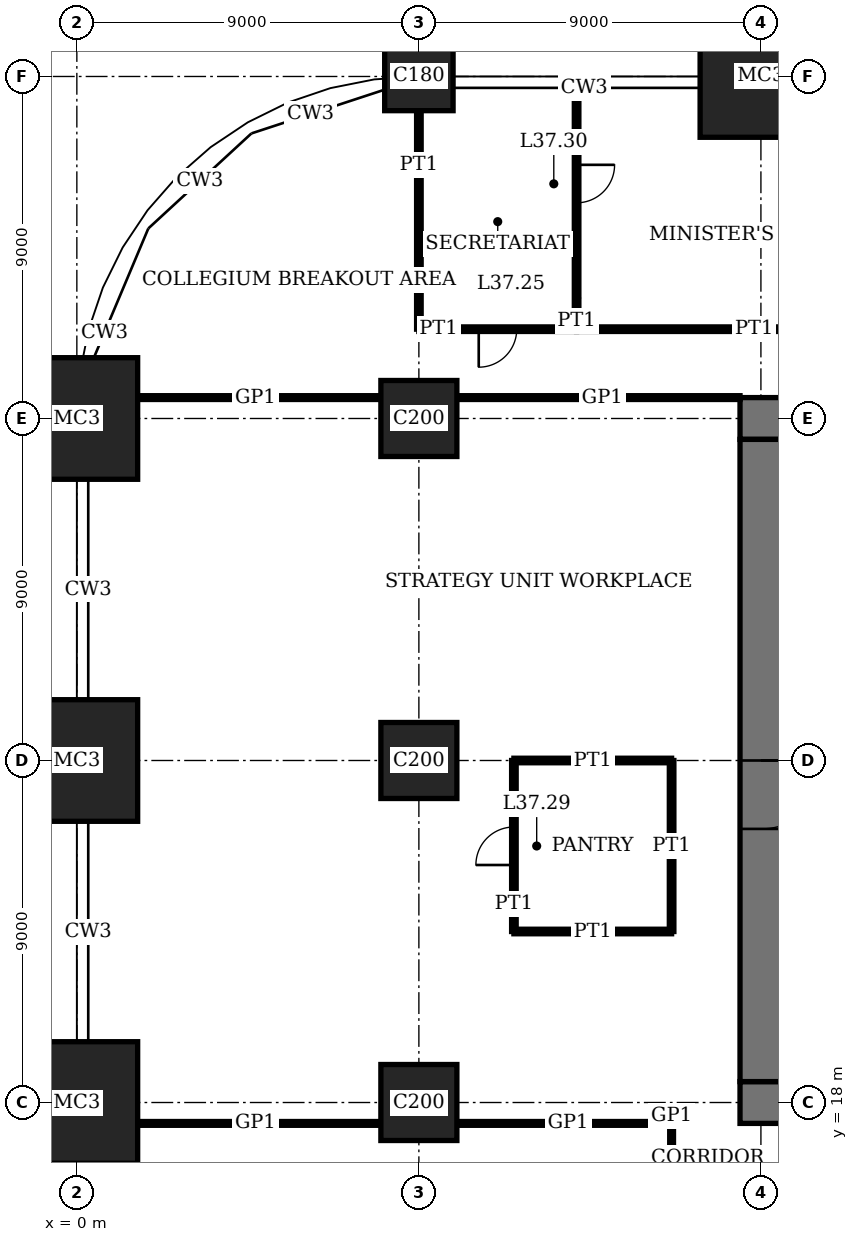
"""IFC4 building model, lengths in metres.
Left out: names, types, materials, properties, quantities, classifications, styles, units other than length and angle.
Written with IfcOpenShell. Run it as: python <this file> out.ifc"""

import sys

from ifc_helpers import new_model, si_unit, direction, frame, frame_2d, origin, origin_2d, place, context, subcontext, project, spatial, rectangle, extrude, element, fill, save


model = new_model("IFC4")
c1 = context("Model", 3, precision=1e-05, world=origin(), true_north=direction((0.0, 1.0)))
c2 = subcontext(c1, "Body", "Model", "MODEL_VIEW")
j1 = project(units=[si_unit("LENGTHUNIT", "METRE"), si_unit("PLANEANGLEUNIT", "RADIAN")], contexts=[c1])
p1 = place(None, origin())
s1 = spatial("IfcSite", under=j1, at=p1, CompositionType="ELEMENT")
p2 = place(p1, origin())
s2 = spatial("IfcBuilding", under=s1, at=p2, CompositionType="ELEMENT")
p3 = place(p2, frame((0.0, 0.0, 153.0)))
s3 = spatial("IfcBuildingStorey", under=s2, at=p3, CompositionType="ELEMENT", Elevation=153.0)
for number, where, z_axis, x_axis in (
    (1, (0.0, 18.0, 0.0), (0.0, 0.0, 1.0), (1.0, 0.0, 0.0)),
    (2, (0.0, 27.0, 0.0), (0.0, 0.0, 1.0), (1.0, 0.0, 0.0)),
    (3, (0.0, 36.0, 0.0), (0.0, 0.0, 1.0), (1.0, 0.0, 0.0)),
):
    element("IfcColumn", number, at=place(p3, frame(where, z_axis=z_axis, x_axis=x_axis)), inside=s3, PredefinedType="COLUMN", context=c2, shape_type="SweptSolid", body=[
        extrude(rectangle(XDim=3.2, YDim=3.2, at=origin_2d()), origin(), (0.0, 0.0, 1.0), 4.2),
    ])
for number, where, z_axis, x_axis in (
    (4, (9.0, 18.0, 0.0), (0.0, 0.0, 1.0), (1.0, 0.0, 0.0)),
    (5, (9.0, 27.0, 0.0), (0.0, 0.0, 1.0), (1.0, 0.0, 0.0)),
    (6, (9.0, 36.0, 0.0), (0.0, 0.0, 1.0), (1.0, 0.0, 0.0)),
):
    element("IfcColumn", number, at=place(p3, frame(where, z_axis=z_axis, x_axis=x_axis)), inside=s3, PredefinedType="COLUMN", context=c2, shape_type="SweptSolid", body=[
        extrude(rectangle(XDim=2.0, YDim=2.0, at=origin_2d()), origin(), (0.0, 0.0, 1.0), 4.2),
    ])
p4 = place(p3, frame((9.0, 45.0, 0.0), z_axis=(0.0, 0.0, 1.0), x_axis=(1.0, 0.0, 0.0)))
e7 = element("IfcColumn", 7, at=p4, inside=s3, PredefinedType="COLUMN", context=c2, shape_type="SweptSolid", body=[
    extrude(rectangle(XDim=1.8, YDim=1.8, at=origin_2d()), origin(), (0.0, 0.0, 1.0), 4.2),
])
p5 = place(p3, frame((18.0, 45.0, 0.0), z_axis=(0.0, 0.0, 1.0), x_axis=(1.0, 0.0, 0.0)))
e8 = element("IfcColumn", 8, at=p5, inside=s3, PredefinedType="COLUMN", context=c2, shape_type="SweptSolid", body=[
    extrude(rectangle(XDim=3.2, YDim=3.2, at=origin_2d()), origin(), (0.0, 0.0, 1.0), 4.2),
])
p6 = place(p3, frame((17.45, 18.0, 0.0), z_axis=(0.0, 0.0, 1.0), x_axis=(1.0, 0.0, 0.0)))
e9 = element("IfcWall", 9, at=p6, inside=s3, PredefinedType="SHEAR", context=c2, shape_type="SweptSolid", body=[
    extrude(rectangle(XDim=28.1, YDim=1.1, at=frame_2d((14.05, 0.0))), origin(), (0.0, 0.0, 1.0), 4.2),
])
p7 = place(p6, frame((11.55, 0.0, 0.0)))
e10 = element("IfcOpeningElement", 10, at=p7, cuts=e9, PredefinedType="OPENING", context=c2, shape_type="SweptSolid", body=[
    extrude(rectangle(XDim=1.0, YDim=2.4, at=frame_2d((0.5, 1.2))), frame((0.0, 0.56, 0.0), z_axis=(0.0, -1.0, 0.0), x_axis=(1.0, 0.0, 0.0)), (0.0, 0.0, 1.0), 1.12),
])
p8 = place(p6, frame((16.55, 0.0, 0.0)))
e11 = element("IfcOpeningElement", 11, at=p8, cuts=e9, PredefinedType="OPENING", context=c2, shape_type="SweptSolid", body=[
    extrude(rectangle(XDim=1.0, YDim=2.4, at=frame_2d((0.5, 1.2))), frame((0.0, 0.56, 0.0), z_axis=(0.0, -1.0, 0.0), x_axis=(1.0, 0.0, 0.0)), (0.0, 0.0, 1.0), 1.12),
])
p9 = place(p6, frame((20.0, 0.0, 0.0)))
e12 = element("IfcOpeningElement", 12, at=p9, cuts=e9, PredefinedType="OPENING", context=c2, shape_type="SweptSolid", body=[
    extrude(rectangle(XDim=1.1, YDim=2.4, at=frame_2d((0.55, 1.2))), frame((0.0, 0.56, 0.0), z_axis=(0.0, -1.0, 0.0), x_axis=(1.0, 0.0, 0.0)), (0.0, 0.0, 1.0), 1.12),
])
p10 = place(p6, frame((24.05, 0.0, 0.0)))
e13 = element("IfcOpeningElement", 13, at=p10, cuts=e9, PredefinedType="OPENING", context=c2, shape_type="SweptSolid", body=[
    extrude(rectangle(XDim=1.0, YDim=2.4, at=frame_2d((0.5, 1.2))), frame((0.0, 0.56, 0.0), z_axis=(0.0, -1.0, 0.0), x_axis=(1.0, 0.0, 0.0)), (0.0, 0.0, 1.0), 1.12),
])
p11 = place(p3, frame((45.55, 36.0, 0.0), z_axis=(0.0, 0.0, 1.0), x_axis=(-1.0, 0.0, 0.0)))
e14 = element("IfcWall", 14, at=p11, inside=s3, PredefinedType="SHEAR", context=c2, shape_type="SweptSolid", body=[
    extrude(rectangle(XDim=28.1, YDim=1.1, at=frame_2d((14.05, 0.0))), origin(), (0.0, 0.0, 1.0), 4.2),
])
p12 = place(p11, frame((11.55, 0.0, 0.0)))
e15 = element("IfcOpeningElement", 15, at=p12, cuts=e14, PredefinedType="OPENING", context=c2, shape_type="SweptSolid", body=[
    extrude(rectangle(XDim=1.0, YDim=2.4, at=frame_2d((0.5, 1.2))), frame((0.0, 0.56, 0.0), z_axis=(0.0, -1.0, 0.0), x_axis=(1.0, 0.0, 0.0)), (0.0, 0.0, 1.0), 1.12),
])
p13 = place(p11, frame((16.55, 0.0, 0.0)))
e16 = element("IfcOpeningElement", 16, at=p13, cuts=e14, PredefinedType="OPENING", context=c2, shape_type="SweptSolid", body=[
    extrude(rectangle(XDim=1.0, YDim=2.4, at=frame_2d((0.5, 1.2))), frame((0.0, 0.56, 0.0), z_axis=(0.0, -1.0, 0.0), x_axis=(1.0, 0.0, 0.0)), (0.0, 0.0, 1.0), 1.12),
])
p14 = place(p11, frame((20.0, 0.0, 0.0)))
e17 = element("IfcOpeningElement", 17, at=p14, cuts=e14, PredefinedType="OPENING", context=c2, shape_type="SweptSolid", body=[
    extrude(rectangle(XDim=1.1, YDim=2.4, at=frame_2d((0.55, 1.2))), frame((0.0, 0.56, 0.0), z_axis=(0.0, -1.0, 0.0), x_axis=(1.0, 0.0, 0.0)), (0.0, 0.0, 1.0), 1.12),
])
p15 = place(p11, frame((24.05, 0.0, 0.0)))
e18 = element("IfcOpeningElement", 18, at=p15, cuts=e14, PredefinedType="OPENING", context=c2, shape_type="SweptSolid", body=[
    extrude(rectangle(XDim=1.0, YDim=2.4, at=frame_2d((0.5, 1.2))), frame((0.0, 0.56, 0.0), z_axis=(0.0, -1.0, 0.0), x_axis=(1.0, 0.0, 0.0)), (0.0, 0.0, 1.0), 1.12),
])
p16 = place(p3, frame((18.0, 35.45, 0.0), z_axis=(0.0, 0.0, 1.0), x_axis=(0.0, -1.0, 0.0)))
e19 = element("IfcWall", 19, at=p16, inside=s3, PredefinedType="SHEAR", context=c2, shape_type="SweptSolid", body=[
    extrude(rectangle(XDim=16.9, YDim=1.1, at=frame_2d((8.45, 0.0))), origin(), (0.0, 0.0, 1.0), 4.2),
])
p17 = place(p16, frame((8.45, 0.0, 0.0)))
e20 = element("IfcOpeningElement", 20, at=p17, cuts=e19, PredefinedType="OPENING", context=c2, shape_type="SweptSolid", body=[
    extrude(rectangle(XDim=1.8, YDim=2.4, at=frame_2d((0.9, 1.2))), frame((0.0, 0.56, 0.0), z_axis=(0.0, -1.0, 0.0), x_axis=(1.0, 0.0, 0.0)), (0.0, 0.0, 1.0), 1.12),
])
p18 = place(p3, frame((1.6, 17.45, 0.0), z_axis=(0.0, 0.0, 1.0), x_axis=(1.0, 0.0, 0.0)))
e21 = element("IfcWall", 21, at=p18, inside=s3, PredefinedType="PARTITIONING", context=c2, shape_type="SweptSolid", body=[
    extrude(rectangle(XDim=6.4, YDim=0.1, at=frame_2d((3.2, 0.0))), origin(), (0.0, 0.0, 1.0), 3.85),
])
p19 = place(p3, frame((10.0, 17.45, 0.0), z_axis=(0.0, 0.0, 1.0), x_axis=(1.0, 0.0, 0.0)))
e22 = element("IfcWall", 22, at=p19, inside=s3, PredefinedType="PARTITIONING", context=c2, shape_type="SweptSolid", body=[
    extrude(rectangle(XDim=5.65, YDim=0.1, at=frame_2d((2.825, 0.0))), origin(), (0.0, 0.0, 1.0), 3.85),
])
p20 = place(p3, frame((11.5, 22.5, 0.0), z_axis=(0.0, 0.0, 1.0), x_axis=(1.0, 0.0, 0.0)))
e23 = element("IfcWall", 23, at=p20, inside=s3, PredefinedType="PARTITIONING", context=c2, shape_type="SweptSolid", body=[
    extrude(rectangle(XDim=4.15, YDim=0.12, at=frame_2d((2.075, 0.0))), origin(), (0.0, 0.0, 1.0), 3.15),
])
p21 = place(p3, frame((11.5, 27.0, 0.0), z_axis=(0.0, 0.0, 1.0), x_axis=(1.0, 0.0, 0.0)))
e24 = element("IfcWall", 24, at=p21, inside=s3, PredefinedType="PARTITIONING", context=c2, shape_type="SweptSolid", body=[
    extrude(rectangle(XDim=4.15, YDim=0.12, at=frame_2d((2.075, 0.0))), origin(), (0.0, 0.0, 1.0), 3.25),
])
p22 = place(p3, frame((1.6, 36.55, 0.0), z_axis=(0.0, 0.0, 1.0), x_axis=(1.0, 0.0, 0.0)))
e25 = element("IfcWall", 25, at=p22, inside=s3, PredefinedType="PARTITIONING", context=c2, shape_type="SweptSolid", body=[
    extrude(rectangle(XDim=6.4, YDim=0.1, at=frame_2d((3.2, 0.0))), origin(), (0.0, 0.0, 1.0), 3.85),
])
p23 = place(p3, frame((10.0, 36.55, 0.0), z_axis=(0.0, 0.0, 1.0), x_axis=(1.0, 0.0, 0.0)))
e26 = element("IfcWall", 26, at=p23, inside=s3, PredefinedType="PARTITIONING", context=c2, shape_type="SweptSolid", body=[
    extrude(rectangle(XDim=7.45, YDim=0.1, at=frame_2d((3.725, 0.0))), origin(), (0.0, 0.0, 1.0), 3.85),
])
p24 = place(p3, frame((9.0, 38.35, 0.0), z_axis=(0.0, 0.0, 1.0), x_axis=(1.0, 0.0, 0.0)))
e27 = element("IfcWall", 27, at=p24, inside=s3, PredefinedType="PARTITIONING", context=c2, shape_type="SweptSolid", body=[
    extrude(rectangle(XDim=4.15, YDim=0.12, at=frame_2d((2.075, 0.0))), origin(), (0.0, 0.0, 1.0), 3.85),
])
p25 = place(p24, frame((1.575, 0.0, 0.0)))
e28 = element("IfcOpeningElement", 28, at=p25, cuts=e27, PredefinedType="OPENING", context=c2, shape_type="SweptSolid", body=[
    extrude(rectangle(XDim=1.0, YDim=2.4, at=frame_2d((0.5, 1.2))), frame((0.0, 0.07, 0.0), z_axis=(0.0, -1.0, 0.0), x_axis=(1.0, 0.0, 0.0)), (0.0, 0.0, 1.0), 0.14),
])
p26 = place(p3, frame((13.15, 38.35, 0.0), z_axis=(0.0, 0.0, 1.0), x_axis=(1.0, 0.0, 0.0)))
e29 = element("IfcWall", 29, at=p26, inside=s3, PredefinedType="PARTITIONING", context=c2, shape_type="SweptSolid", body=[
    extrude(rectangle(XDim=9.35, YDim=0.12, at=frame_2d((4.675, 0.0))), origin(), (0.0, 0.0, 1.0), 3.85),
])
p27 = place(p3, frame((9.0, 38.35, 0.0), z_axis=(0.0, 0.0, 1.0), x_axis=(0.0, 1.0, 0.0)))
e30 = element("IfcWall", 30, at=p27, inside=s3, PredefinedType="PARTITIONING", context=c2, shape_type="SweptSolid", body=[
    extrude(rectangle(XDim=5.75, YDim=0.12, at=frame_2d((2.875, 0.0))), origin(), (0.0, 0.0, 1.0), 3.05),
])
p28 = place(p3, frame((11.5, 22.5, 0.0), z_axis=(0.0, 0.0, 1.0), x_axis=(0.0, 1.0, 0.0)))
e31 = element("IfcWall", 31, at=p28, inside=s3, PredefinedType="PARTITIONING", context=c2, shape_type="SweptSolid", body=[
    extrude(rectangle(XDim=4.5, YDim=0.12, at=frame_2d((2.25, 0.0))), origin(), (0.0, 0.0, 1.0), 3.85),
])
p29 = place(p28, frame((1.75, 0.0, 0.0)))
e32 = element("IfcOpeningElement", 32, at=p29, cuts=e31, PredefinedType="OPENING", context=c2, shape_type="SweptSolid", body=[
    extrude(rectangle(XDim=1.0, YDim=2.4, at=frame_2d((0.5, 1.2))), frame((0.0, 0.07, 0.0), z_axis=(0.0, -1.0, 0.0), x_axis=(1.0, 0.0, 0.0)), (0.0, 0.0, 1.0), 0.14),
])
p30 = place(p3, frame((13.15, 38.35, 0.0), z_axis=(0.0, 0.0, 1.0), x_axis=(0.0, 1.0, 0.0)))
e33 = element("IfcWall", 33, at=p30, inside=s3, PredefinedType="PARTITIONING", context=c2, shape_type="SweptSolid", body=[
    extrude(rectangle(XDim=6.34, YDim=0.12, at=frame_2d((3.17, 0.0))), origin(), (0.0, 0.0, 1.0), 3.85),
])
p31 = place(p30, frame((3.325, 0.0, 0.0)))
e34 = element("IfcOpeningElement", 34, at=p31, cuts=e33, PredefinedType="OPENING", context=c2, shape_type="SweptSolid", body=[
    extrude(rectangle(XDim=1.0, YDim=2.4, at=frame_2d((0.5, 1.2))), frame((0.0, 0.07, 0.0), z_axis=(0.0, -1.0, 0.0), x_axis=(1.0, 0.0, 0.0)), (0.0, 0.0, 1.0), 0.14),
])
p32 = place(p3, frame((15.65, 22.5, 0.0), z_axis=(0.0, 0.0, 1.0), x_axis=(0.0, 1.0, 0.0)))
e35 = element("IfcWall", 35, at=p32, inside=s3, PredefinedType="PARTITIONING", context=c2, shape_type="SweptSolid", body=[
    extrude(rectangle(XDim=4.5, YDim=0.12, at=frame_2d((2.25, 0.0))), origin(), (0.0, 0.0, 1.0), 3.85),
])
p33 = place(p3, frame((15.65, 15.65, 0.0), z_axis=(0.0, 0.0, 1.0), x_axis=(0.0, 1.0, 0.0)))
e36 = element("IfcWall", 36, at=p33, inside=s3, PredefinedType="PARTITIONING", context=c2, shape_type="SweptSolid", body=[
    extrude(rectangle(XDim=1.8, YDim=0.1, at=frame_2d((0.9, 0.0))), origin(), (0.0, 0.0, 1.0), 3.85),
])
p34 = place(p17, origin())
e37 = element("IfcDoor", 37, at=p34, inside=s3, OperationType="DOUBLE_DOOR_DOUBLE_SWING", PredefinedType="DOOR", context=c2, shape_type="SweptSolid", body=[
    extrude(rectangle(XDim=1.8, YDim=2.4, at=frame_2d((0.9, 1.2))), frame((0.0, 0.03, 0.0), z_axis=(0.0, -1.0, 0.0), x_axis=(1.0, 0.0, 0.0)), (0.0, 0.0, 1.0), 0.06),
    extrude(rectangle(XDim=0.04, YDim=2.4, at=frame_2d((0.02, 1.2))), frame((0.0, 0.55, 0.0), z_axis=(0.0, -1.0, 0.0), x_axis=(1.0, 0.0, 0.0)), (0.0, 0.0, 1.0), 1.1),
    extrude(rectangle(XDim=0.04, YDim=2.4, at=frame_2d((1.78, 1.2))), frame((0.0, 0.55, 0.0), z_axis=(0.0, -1.0, 0.0), x_axis=(1.0, 0.0, 0.0)), (0.0, 0.0, 1.0), 1.1),
    extrude(rectangle(XDim=1.8, YDim=0.04, at=frame_2d((0.9, 2.38))), frame((0.0, 0.55, 0.0), z_axis=(0.0, -1.0, 0.0), x_axis=(1.0, 0.0, 0.0)), (0.0, 0.0, 1.0), 1.1),
])
fill(e20, e37)
p35 = place(p25, origin())
e38 = element("IfcDoor", 38, at=p35, inside=s3, OperationType="SINGLE_SWING_LEFT", PredefinedType="DOOR", context=c2, shape_type="SweptSolid", body=[
    extrude(rectangle(XDim=1.0, YDim=2.4, at=frame_2d((0.5, 1.2))), frame((0.0, 0.025, 0.0), z_axis=(0.0, -1.0, 0.0), x_axis=(1.0, 0.0, 0.0)), (0.0, 0.0, 1.0), 0.05),
])
fill(e28, e38)
p36 = place(p29, origin())
e39 = element("IfcDoor", 39, at=p36, inside=s3, OperationType="SINGLE_SWING_RIGHT", PredefinedType="DOOR", context=c2, shape_type="SweptSolid", body=[
    extrude(rectangle(XDim=1.0, YDim=2.4, at=frame_2d((0.5, 1.2))), frame((0.0, 0.025, 0.0), z_axis=(0.0, -1.0, 0.0), x_axis=(1.0, 0.0, 0.0)), (0.0, 0.0, 1.0), 0.05),
])
fill(e32, e39)
p37 = place(p31, origin())
e40 = element("IfcDoor", 40, at=p37, inside=s3, OperationType="SINGLE_SWING_RIGHT", PredefinedType="DOOR", context=c2, shape_type="SweptSolid", body=[
    extrude(rectangle(XDim=1.0, YDim=2.4, at=frame_2d((0.5, 1.2))), frame((0.0, 0.025, 0.0), z_axis=(0.0, -1.0, 0.0), x_axis=(1.0, 0.0, 0.0)), (0.0, 0.0, 1.0), 0.05),
])
fill(e34, e40)
save(model, sys.argv[1])
